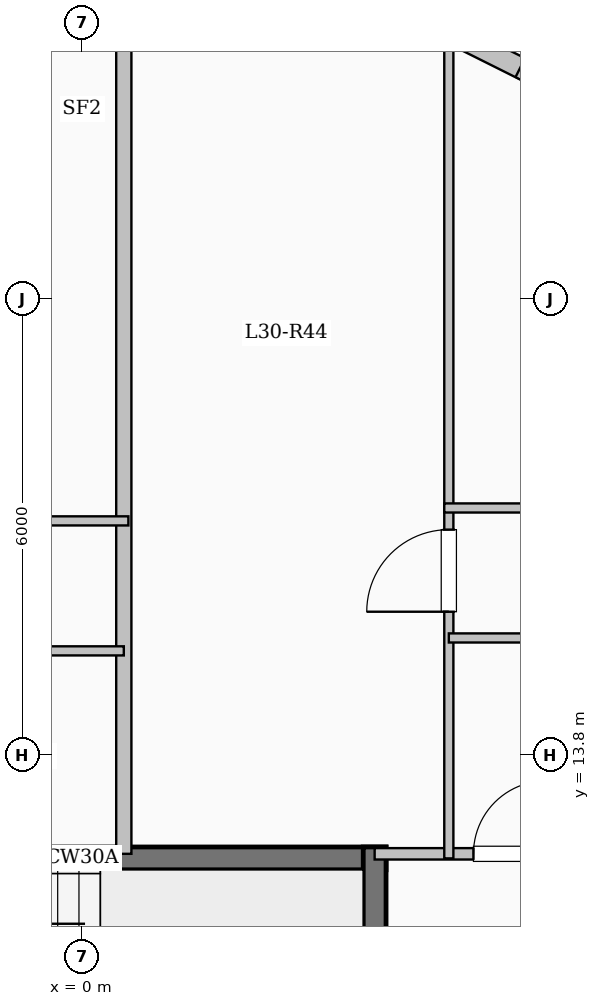
"""IFC4 building model, lengths in metres.
Left out: names, types, materials, properties, quantities, classifications, styles, units other than length and angle.
Written with IfcOpenShell. Run it as: python <this file> out.ifc"""

import sys

from ifc_helpers import new_model, si_unit, direction, frame, frame_2d, origin, place, context, subcontext, project, spatial, rectangle, extrude, element, fill, save


model = new_model("IFC4")
c1 = context("Model", 3, precision=1e-05, world=origin(), true_north=direction((0.0, 1.0)))
c2 = subcontext(c1, "Body", "Model", "MODEL_VIEW")
j1 = project(units=[si_unit("LENGTHUNIT", "METRE"), si_unit("PLANEANGLEUNIT", "RADIAN")], contexts=[c1])
p1 = place(None, origin())
s1 = spatial("IfcSite", under=j1, at=p1, CompositionType="ELEMENT")
p2 = place(p1, origin())
s2 = spatial("IfcBuilding", under=s1, at=p2, CompositionType="ELEMENT")
p3 = place(p2, frame((0.0, 0.0, 111.8)))
s3 = spatial("IfcBuildingStorey", under=s2, at=p3, CompositionType="ELEMENT", Elevation=111.8)
p4 = place(p3, frame((4.35, 23.55, 0.0), z_axis=(0.0, 0.0, 1.0), x_axis=(0.894427191, -0.4472135955, 0.0)))
e1 = element("IfcWall", 1, at=p4, inside=s3, PredefinedType="SOLIDWALL", context=c2, shape_type="SweptSolid", body=[
    extrude(rectangle(XDim=3.354, YDim=0.28, at=frame_2d((1.677, 0.0))), origin(), (0.0, 0.0, 1.0), 3.1),
])
p5 = place(p4, frame((1.583, 0.0, 0.95)))
e2 = element("IfcOpeningElement", 2, at=p5, cuts=e1, PredefinedType="OPENING", context=c2, shape_type="SweptSolid", body=[
    extrude(rectangle(XDim=1.2, YDim=1.5, at=frame_2d((0.6, 0.75))), frame((0.0, 0.15, 0.0), z_axis=(0.0, -1.0, 0.0), x_axis=(1.0, 0.0, 0.0)), (0.0, 0.0, 1.0), 0.3),
])
p6 = place(p3, frame((-4.0, 12.44, 0.0), z_axis=(0.0, 0.0, 1.0), x_axis=(1.0, 0.0, 0.0)))
e3 = element("IfcWall", 3, at=p6, inside=s3, PredefinedType="SHEAR", context=c2, shape_type="SweptSolid", body=[
    extrude(rectangle(XDim=8.0, YDim=0.3, at=frame_2d((4.0, 0.0))), origin(), (0.0, 0.0, 1.0), 3.35),
])
p7 = place(p3, frame((3.85, 9.0, 0.0), z_axis=(0.0, 0.0, 1.0), x_axis=(0.0, 1.0, 0.0)))
e4 = element("IfcWall", 4, at=p7, inside=s3, PredefinedType="SHEAR", context=c2, shape_type="SweptSolid", body=[
    extrude(rectangle(XDim=3.59, YDim=0.3, at=frame_2d((1.795, 0.0))), origin(), (0.0, 0.0, 1.0), 3.35),
])
p8 = place(p3, frame((3.85, 12.5, 0.0), z_axis=(0.0, 0.0, 1.0), x_axis=(1.0, 0.0, 0.0)))
e5 = element("IfcWall", 5, at=p8, inside=s3, PredefinedType="PARTITIONING", context=c2, shape_type="SweptSolid", body=[
    extrude(rectangle(XDim=17.2, YDim=0.15, at=frame_2d((8.6, 0.0))), origin(), (0.0, 0.0, 1.0), 3.1),
])
p9 = place(p8, frame((1.3, 0.0, 0.0)))
e6 = element("IfcOpeningElement", 6, at=p9, cuts=e5, PredefinedType="OPENING", context=c2, shape_type="SweptSolid", body=[
    extrude(rectangle(XDim=0.96, YDim=2.15, at=frame_2d((0.48, 1.075))), frame((0.0, 0.085, 0.0), z_axis=(0.0, -1.0, 0.0), x_axis=(1.0, 0.0, 0.0)), (0.0, 0.0, 1.0), 0.17),
])
p10 = place(p8, frame((8.06, 0.0, 0.0)))
e7 = element("IfcOpeningElement", 7, at=p10, cuts=e5, PredefinedType="OPENING", context=c2, shape_type="SweptSolid", body=[
    extrude(rectangle(XDim=0.96, YDim=2.15, at=frame_2d((0.48, 1.075))), frame((0.0, 0.085, 0.0), z_axis=(0.0, -1.0, 0.0), x_axis=(1.0, 0.0, 0.0)), (0.0, 0.0, 1.0), 0.17),
])
p11 = place(p3, frame((0.55, 12.5, 0.0), z_axis=(0.0, 0.0, 1.0), x_axis=(0.0, 1.0, 0.0)))
e8 = element("IfcWall", 8, at=p11, inside=s3, PredefinedType="SOLIDWALL", context=c2, shape_type="SweptSolid", body=[
    extrude(rectangle(XDim=11.08, YDim=0.2, at=frame_2d((5.54, 0.0))), origin(), (0.0, 0.0, 1.0), 3.1),
])
p12 = place(p3, frame((-2.377, 15.17, 0.0), z_axis=(0.0, 0.0, 1.0), x_axis=(1.0, 0.0, 0.0)))
e9 = element("IfcWall", 9, at=p12, inside=s3, PredefinedType="PARTITIONING", context=c2, shape_type="SweptSolid", body=[
    extrude(rectangle(XDim=2.927, YDim=0.12, at=frame_2d((1.463, 0.0))), origin(), (0.0, 0.0, 1.0), 3.1),
])
p13 = place(p12, frame((1.023, 0.0, 0.0)))
e10 = element("IfcOpeningElement", 10, at=p13, cuts=e9, PredefinedType="OPENING", context=c2, shape_type="SweptSolid", body=[
    extrude(rectangle(XDim=0.88, YDim=2.1, at=frame_2d((0.44, 1.05))), frame((0.0, 0.07, 0.0), z_axis=(0.0, -1.0, 0.0), x_axis=(1.0, 0.0, 0.0)), (0.0, 0.0, 1.0), 0.14),
])
p14 = place(p3, frame((-6.237, 16.88, 0.0), z_axis=(0.0, 0.0, 1.0), x_axis=(1.0, 0.0, 0.0)))
e11 = element("IfcWall", 11, at=p14, inside=s3, PredefinedType="PARTITIONING", context=c2, shape_type="SweptSolid", body=[
    extrude(rectangle(XDim=6.847, YDim=0.12, at=frame_2d((3.424, 0.0))), origin(), (0.0, 0.0, 1.0), 3.1),
])
p15 = place(p14, frame((1.227, 0.0, 0.0)))
e12 = element("IfcOpeningElement", 12, at=p15, cuts=e11, PredefinedType="OPENING", context=c2, shape_type="SweptSolid", body=[
    extrude(rectangle(XDim=0.88, YDim=2.1, at=frame_2d((0.44, 1.05))), frame((0.0, 0.07, 0.0), z_axis=(0.0, -1.0, 0.0), x_axis=(1.0, 0.0, 0.0)), (0.0, 0.0, 1.0), 0.14),
])
p16 = place(p14, frame((4.56, 0.0, 0.0)))
e13 = element("IfcOpeningElement", 13, at=p16, cuts=e11, PredefinedType="OPENING", context=c2, shape_type="SweptSolid", body=[
    extrude(rectangle(XDim=0.88, YDim=2.1, at=frame_2d((0.44, 1.05))), frame((0.0, 0.07, 0.0), z_axis=(0.0, -1.0, 0.0), x_axis=(1.0, 0.0, 0.0)), (0.0, 0.0, 1.0), 0.14),
])
p17 = place(p3, frame((4.826, 12.44, 0.0), z_axis=(0.0, 0.0, 1.0), x_axis=(0.0, 1.0, 0.0)))
e14 = element("IfcWall", 14, at=p17, inside=s3, PredefinedType="PARTITIONING", context=c2, shape_type="SweptSolid", body=[
    extrude(rectangle(XDim=11.14, YDim=0.12, at=frame_2d((5.57, 0.0))), origin(), (0.0, 0.0, 1.0), 3.1),
])
p18 = place(p17, frame((3.245, 0.0, 0.0)))
e15 = element("IfcOpeningElement", 15, at=p18, cuts=e14, PredefinedType="OPENING", context=c2, shape_type="SweptSolid", body=[
    extrude(rectangle(XDim=1.08, YDim=2.15, at=frame_2d((0.54, 1.075))), frame((0.0, 0.07, 0.0), z_axis=(0.0, -1.0, 0.0), x_axis=(1.0, 0.0, 0.0)), (0.0, 0.0, 1.0), 0.14),
])
p19 = place(p3, frame((4.826, 15.34, 0.0), z_axis=(0.0, 0.0, 1.0), x_axis=(1.0, 0.0, 0.0)))
e16 = element("IfcWall", 16, at=p19, inside=s3, PredefinedType="PARTITIONING", context=c2, shape_type="SweptSolid", body=[
    extrude(rectangle(XDim=3.099, YDim=0.12, at=frame_2d((1.55, 0.0))), origin(), (0.0, 0.0, 1.0), 3.1),
])
p20 = place(p19, frame((1.11, 0.0, 0.0)))
e17 = element("IfcOpeningElement", 17, at=p20, cuts=e16, PredefinedType="OPENING", context=c2, shape_type="SweptSolid", body=[
    extrude(rectangle(XDim=0.88, YDim=2.1, at=frame_2d((0.44, 1.05))), frame((0.0, 0.07, 0.0), z_axis=(0.0, -1.0, 0.0), x_axis=(1.0, 0.0, 0.0)), (0.0, 0.0, 1.0), 0.14),
])
p21 = place(p3, frame((4.766, 17.05, 0.0), z_axis=(0.0, 0.0, 1.0), x_axis=(1.0, 0.0, 0.0)))
e18 = element("IfcWall", 18, at=p21, inside=s3, PredefinedType="PARTITIONING", context=c2, shape_type="SweptSolid", body=[
    extrude(rectangle(XDim=6.504, YDim=0.12, at=frame_2d((3.252, 0.0))), origin(), (0.0, 0.0, 1.0), 3.1),
])
p22 = place(p21, frame((1.141, 0.0, 0.0)))
e19 = element("IfcOpeningElement", 19, at=p22, cuts=e18, PredefinedType="OPENING", context=c2, shape_type="SweptSolid", body=[
    extrude(rectangle(XDim=0.88, YDim=2.1, at=frame_2d((0.44, 1.05))), frame((0.0, 0.07, 0.0), z_axis=(0.0, -1.0, 0.0), x_axis=(1.0, 0.0, 0.0)), (0.0, 0.0, 1.0), 0.14),
])
p23 = place(p21, frame((4.303, 0.0, 0.0)))
e20 = element("IfcOpeningElement", 20, at=p23, cuts=e18, PredefinedType="OPENING", context=c2, shape_type="SweptSolid", body=[
    extrude(rectangle(XDim=0.88, YDim=2.1, at=frame_2d((0.44, 1.05))), frame((0.0, 0.07, 0.0), z_axis=(0.0, -1.0, 0.0), x_axis=(1.0, 0.0, 0.0)), (0.0, 0.0, 1.0), 0.14),
])
p24 = place(p5, origin())
e21 = element("IfcWindow", 21, at=p24, inside=s3, PartitioningType="SINGLE_PANEL", PredefinedType="WINDOW", context=c2, shape_type="SweptSolid", body=[
    extrude(rectangle(XDim=1.2, YDim=1.5, at=frame_2d((0.6, 0.75))), frame((0.0, 0.03, 0.0), z_axis=(0.0, -1.0, 0.0), x_axis=(1.0, 0.0, 0.0)), (0.0, 0.0, 1.0), 0.06),
])
fill(e2, e21)
p25 = place(p9, origin())
e22 = element("IfcDoor", 22, at=p25, inside=s3, OperationType="SINGLE_SWING_RIGHT", PredefinedType="DOOR", context=c2, shape_type="SweptSolid", body=[
    extrude(rectangle(XDim=0.96, YDim=2.15, at=frame_2d((0.48, 1.075))), frame((0.0, 0.025, 0.0), z_axis=(0.0, -1.0, 0.0), x_axis=(1.0, 0.0, 0.0)), (0.0, 0.0, 1.0), 0.05),
])
fill(e6, e22)
p26 = place(p18, origin())
e23 = element("IfcDoor", 23, at=p26, inside=s3, OperationType="SINGLE_SWING_LEFT", PredefinedType="DOOR", context=c2, shape_type="SweptSolid", body=[
    extrude(rectangle(XDim=1.08, YDim=2.15, at=frame_2d((0.54, 1.075))), frame((0.0, 0.025, 0.0), z_axis=(0.0, -1.0, 0.0), x_axis=(1.0, 0.0, 0.0)), (0.0, 0.0, 1.0), 0.05),
])
fill(e15, e23)
save(model, sys.argv[1])
